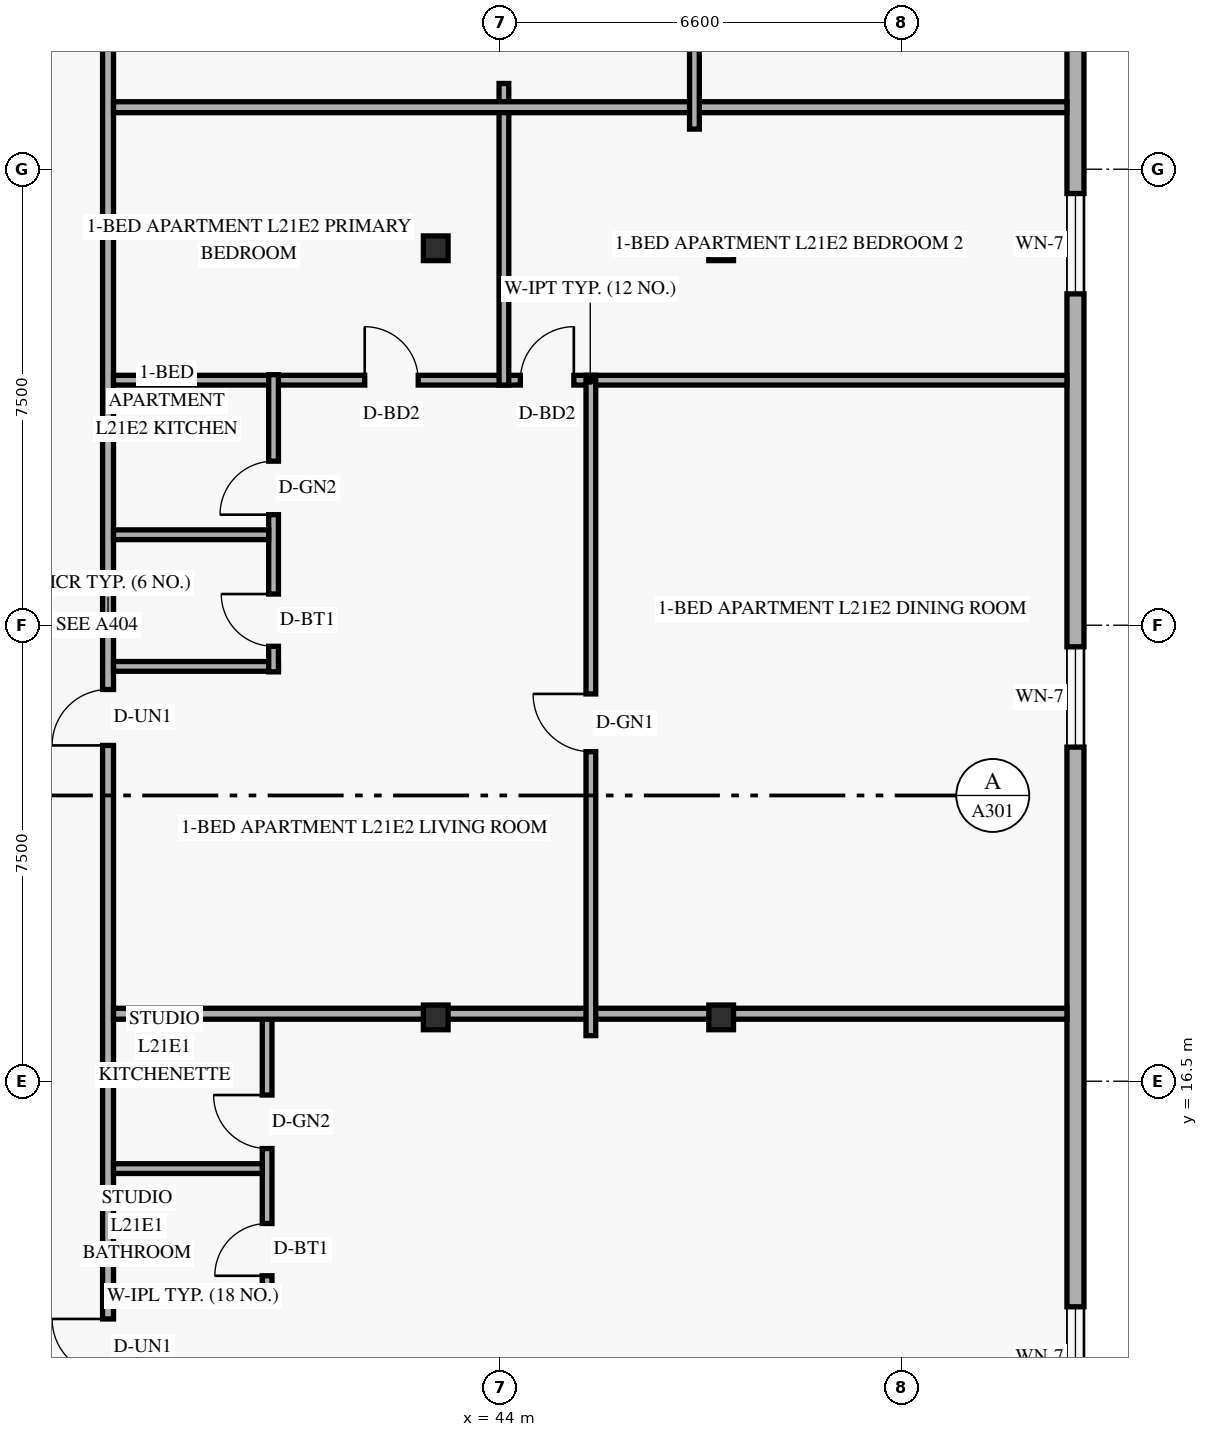
"""IFC4 building model, lengths in metres.
Left out: names, types, materials, properties, quantities, classifications, styles, units other than length and angle.
Written with IfcOpenShell. Run it as: python <this file> out.ifc"""

import sys

from ifc_helpers import new_model, si_unit, direction, frame, frame_2d, origin, origin_2d, place, context, subcontext, project, spatial, rectangle, hollow_rectangle, extrude, element, fill, save


model = new_model("IFC4")
c1 = context("Model", 3, precision=1e-05, world=origin(), true_north=direction((0.0, 1.0)))
c2 = subcontext(c1, "Body", "Model", "MODEL_VIEW")
j1 = project(units=[si_unit("LENGTHUNIT", "METRE"), si_unit("PLANEANGLEUNIT", "RADIAN")], contexts=[c1])
p1 = place(None, origin())
s1 = spatial("IfcSite", under=j1, at=p1, CompositionType="ELEMENT")
p2 = place(p1, origin())
s2 = spatial("IfcBuilding", under=s1, at=p2, CompositionType="ELEMENT")
p3 = place(p2, frame((0.0, 0.0, 84.0)))
s3 = spatial("IfcBuildingStorey", under=s2, at=p3, CompositionType="ELEMENT", Elevation=84.0)
for number, where, z_axis, x_axis in (
    (1, (42.876, 17.55, 0.0), (0.035, 0.0, 0.999), (0.0, 1.0, 0.0)),
    (2, (42.876, 30.2, 0.0), (0.035, 0.0, 0.999), (0.0, 1.0, 0.0)),
):
    element("IfcColumn", number, at=place(p3, frame(where, z_axis=z_axis, x_axis=x_axis)), inside=s3, PredefinedType="COLUMN", context=c2, shape_type="SweptSolid", body=[
        extrude(hollow_rectangle(XDim=0.406, YDim=0.406, WallThickness=0.016, at=origin_2d()), origin(), (0.0, 0.0, 1.0), 3.602),
    ])
for number, where, z_axis, x_axis in (
    (3, (47.529, 17.55, 0.0), (0.058, 0.0, 0.998), (0.0, 1.0, 0.0)),
    (4, (47.529, 30.2, 0.0), (0.058, 0.0, 0.998), (0.0, 1.0, 0.0)),
):
    element("IfcColumn", number, at=place(p3, frame(where, z_axis=z_axis, x_axis=x_axis)), inside=s3, PredefinedType="COLUMN", context=c2, shape_type="SweptSolid", body=[
        extrude(hollow_rectangle(XDim=0.406, YDim=0.406, WallThickness=0.016, at=origin_2d()), origin(), (0.0, 0.0, 1.0), 3.606),
    ])
p4 = place(p3, frame((53.46, 6.32, 0.0), z_axis=(0.0, 0.0, 1.0), x_axis=(0.0, 1.0, 0.0)))
e5 = element("IfcWall", 5, at=p4, inside=s3, PredefinedType="SOLIDWALL", context=c2, shape_type="SweptSolid", body=[
    extrude(rectangle(XDim=35.36, YDim=0.28, at=frame_2d((17.68, 0.0))), origin(), (0.0, 0.0, 1.0), 3.36),
])
p5 = place(p4, frame((4.82, 0.0, 0.85)))
e6 = element("IfcOpeningElement", 6, at=p5, cuts=e5, PredefinedType="OPENING", context=c2, shape_type="SweptSolid", body=[
    extrude(rectangle(XDim=1.65, YDim=1.6, at=frame_2d((0.825, 0.8))), frame((0.0, 0.15, 0.0), z_axis=(0.0, -1.0, 0.0), x_axis=(1.0, 0.0, 0.0)), (0.0, 0.0, 1.0), 0.3),
])
p6 = place(p4, frame((15.675, 0.0, 0.85)))
e7 = element("IfcOpeningElement", 7, at=p6, cuts=e5, PredefinedType="OPENING", context=c2, shape_type="SweptSolid", body=[
    extrude(rectangle(XDim=1.65, YDim=1.6, at=frame_2d((0.825, 0.8))), frame((0.0, 0.15, 0.0), z_axis=(0.0, -1.0, 0.0), x_axis=(1.0, 0.0, 0.0)), (0.0, 0.0, 1.0), 0.3),
])
p7 = place(p4, frame((23.13, 0.0, 0.85)))
e8 = element("IfcOpeningElement", 8, at=p7, cuts=e5, PredefinedType="OPENING", context=c2, shape_type="SweptSolid", body=[
    extrude(rectangle(XDim=1.65, YDim=1.6, at=frame_2d((0.825, 0.8))), frame((0.0, 0.15, 0.0), z_axis=(0.0, -1.0, 0.0), x_axis=(1.0, 0.0, 0.0)), (0.0, 0.0, 1.0), 0.3),
])
p8 = place(p4, frame((29.695, 0.0, 0.85)))
e9 = element("IfcOpeningElement", 9, at=p8, cuts=e5, PredefinedType="OPENING", context=c2, shape_type="SweptSolid", body=[
    extrude(rectangle(XDim=1.65, YDim=1.6, at=frame_2d((0.825, 0.8))), frame((0.0, 0.15, 0.0), z_axis=(0.0, -1.0, 0.0), x_axis=(1.0, 0.0, 0.0)), (0.0, 0.0, 1.0), 0.3),
])
p9 = place(p3, frame((37.55, 2.98, 0.0), z_axis=(0.0, 0.0, 1.0), x_axis=(0.0, 1.0, 0.0)))
e10 = element("IfcWall", 10, at=p9, inside=s3, PredefinedType="STANDARD", context=c2, shape_type="SweptSolid", body=[
    extrude(rectangle(XDim=42.04, YDim=0.18, at=frame_2d((21.02, 0.0))), origin(), (0.0, 0.0, 1.0), 2.731),
])
p10 = place(p9, frame((8.69, 0.0, 0.0)))
e11 = element("IfcOpeningElement", 11, at=p10, cuts=e10, PredefinedType="OPENING", context=c2, shape_type="SweptSolid", body=[
    extrude(rectangle(XDim=0.92, YDim=2.15, at=frame_2d((0.46, 1.075))), frame((0.0, 0.1, 0.0), z_axis=(0.0, -1.0, 0.0), x_axis=(1.0, 0.0, 0.0)), (0.0, 0.0, 1.0), 0.2),
])
p11 = place(p9, frame((19.043, 0.0, 0.0)))
e12 = element("IfcOpeningElement", 12, at=p11, cuts=e10, PredefinedType="OPENING", context=c2, shape_type="SweptSolid", body=[
    extrude(rectangle(XDim=0.92, YDim=2.15, at=frame_2d((0.46, 1.075))), frame((0.0, 0.1, 0.0), z_axis=(0.0, -1.0, 0.0), x_axis=(1.0, 0.0, 0.0)), (0.0, 0.0, 1.0), 0.2),
])
p12 = place(p9, frame((32.145, 0.0, 0.0)))
e13 = element("IfcOpeningElement", 13, at=p12, cuts=e10, PredefinedType="OPENING", context=c2, shape_type="SweptSolid", body=[
    extrude(rectangle(XDim=0.92, YDim=2.15, at=frame_2d((0.46, 1.075))), frame((0.0, 0.1, 0.0), z_axis=(0.0, -1.0, 0.0), x_axis=(1.0, 0.0, 0.0)), (0.0, 0.0, 1.0), 0.2),
])
p13 = place(p3, frame((37.64, 12.97, 0.0), z_axis=(0.0, 0.0, 1.0), x_axis=(1.0, 0.0, 0.0)))
e14 = element("IfcWall", 14, at=p13, inside=s3, PredefinedType="PLUMBINGWALL", context=c2, shape_type="SweptSolid", body=[
    extrude(rectangle(XDim=2.606, YDim=0.16, at=frame_2d((1.303, 0.0))), origin(), (0.0, 0.0, 1.0), 3.36),
])
p14 = place(p3, frame((40.166, 12.88, 0.0), z_axis=(0.0, 0.0, 1.0), x_axis=(0.0, 1.0, 0.0)))
e15 = element("IfcWall", 15, at=p14, inside=s3, PredefinedType="PLUMBINGWALL", context=c2, shape_type="SweptSolid", body=[
    extrude(rectangle(XDim=4.73, YDim=0.16, at=frame_2d((2.365, 0.0))), origin(), (0.0, 0.0, 1.0), 2.731),
])
p15 = place(p14, frame((0.42, 0.0, 0.0)))
e16 = element("IfcOpeningElement", 16, at=p15, cuts=e15, PredefinedType="OPENING", context=c2, shape_type="SweptSolid", body=[
    extrude(rectangle(XDim=0.86, YDim=2.12, at=frame_2d((0.43, 1.06))), frame((0.0, 0.09, 0.0), z_axis=(0.0, -1.0, 0.0), x_axis=(1.0, 0.0, 0.0)), (0.0, 0.0, 1.0), 0.18),
])
p16 = place(p14, frame((2.513, 0.0, 0.0)))
e17 = element("IfcOpeningElement", 17, at=p16, cuts=e15, PredefinedType="OPENING", context=c2, shape_type="SweptSolid", body=[
    extrude(rectangle(XDim=0.88, YDim=2.12, at=frame_2d((0.44, 1.06))), frame((0.0, 0.09, 0.0), z_axis=(0.0, -1.0, 0.0), x_axis=(1.0, 0.0, 0.0)), (0.0, 0.0, 1.0), 0.18),
])
p17 = place(p3, frame((37.64, 15.063, 0.0), z_axis=(0.0, 0.0, 1.0), x_axis=(1.0, 0.0, 0.0)))
e18 = element("IfcWall", 18, at=p17, inside=s3, PredefinedType="PLUMBINGWALL", context=c2, shape_type="SweptSolid", body=[
    extrude(rectangle(XDim=2.446, YDim=0.16, at=frame_2d((1.223, 0.0))), origin(), (0.0, 0.0, 1.0), 3.36),
])
p18 = place(p3, frame((37.64, 17.61, 0.0), z_axis=(0.0, 0.0, 1.0), x_axis=(1.0, 0.0, 0.0)))
e19 = element("IfcWall", 19, at=p18, inside=s3, PredefinedType="PARTITIONING", context=c2, shape_type="SweptSolid", body=[
    extrude(rectangle(XDim=15.68, YDim=0.18, at=frame_2d((7.84, 0.0))), origin(), (0.0, 0.0, 1.0), 2.731),
])
p19 = place(p3, frame((37.64, 28.03, 0.0), z_axis=(0.0, 0.0, 1.0), x_axis=(1.0, 0.0, 0.0)))
e20 = element("IfcWall", 20, at=p19, inside=s3, PredefinedType="PARTITIONING", context=c2, shape_type="SweptSolid", body=[
    extrude(rectangle(XDim=15.68, YDim=0.16, at=frame_2d((7.84, 0.0))), origin(), (0.0, 0.0, 1.0), 2.731),
])
p20 = place(p19, frame((4.131, 0.0, 0.0)))
e21 = element("IfcOpeningElement", 21, at=p20, cuts=e20, PredefinedType="OPENING", context=c2, shape_type="SweptSolid", body=[
    extrude(rectangle(XDim=0.88, YDim=2.14, at=frame_2d((0.44, 1.07))), frame((0.0, 0.09, 0.0), z_axis=(0.0, -1.0, 0.0), x_axis=(1.0, 0.0, 0.0)), (0.0, 0.0, 1.0), 0.18),
])
p21 = place(p19, frame((6.69, 0.0, 0.0)))
e22 = element("IfcOpeningElement", 22, at=p21, cuts=e20, PredefinedType="OPENING", context=c2, shape_type="SweptSolid", body=[
    extrude(rectangle(XDim=0.88, YDim=2.14, at=frame_2d((0.44, 1.07))), frame((0.0, 0.09, 0.0), z_axis=(0.0, -1.0, 0.0), x_axis=(1.0, 0.0, 0.0)), (0.0, 0.0, 1.0), 0.18),
])
p22 = place(p3, frame((37.64, 23.323, 0.0), z_axis=(0.0, 0.0, 1.0), x_axis=(1.0, 0.0, 0.0)))
e23 = element("IfcWall", 23, at=p22, inside=s3, PredefinedType="PLUMBINGWALL", context=c2, shape_type="SweptSolid", body=[
    extrude(rectangle(XDim=2.712, YDim=0.16, at=frame_2d((1.356, 0.0))), origin(), (0.0, 0.0, 1.0), 3.36),
])
p23 = place(p3, frame((40.272, 23.233, 0.0), z_axis=(0.0, 0.0, 1.0), x_axis=(0.0, 1.0, 0.0)))
e24 = element("IfcWall", 24, at=p23, inside=s3, PredefinedType="PLUMBINGWALL", context=c2, shape_type="SweptSolid", body=[
    extrude(rectangle(XDim=4.887, YDim=0.16, at=frame_2d((2.444, 0.0))), origin(), (0.0, 0.0, 1.0), 3.36),
])
p24 = place(p23, frame((0.42, 0.0, 0.0)))
e25 = element("IfcOpeningElement", 25, at=p24, cuts=e24, PredefinedType="OPENING", context=c2, shape_type="SweptSolid", body=[
    extrude(rectangle(XDim=0.86, YDim=2.12, at=frame_2d((0.43, 1.06))), frame((0.0, 0.09, 0.0), z_axis=(0.0, -1.0, 0.0), x_axis=(1.0, 0.0, 0.0)), (0.0, 0.0, 1.0), 0.18),
])
p25 = place(p23, frame((2.585, 0.0, 0.0)))
e26 = element("IfcOpeningElement", 26, at=p25, cuts=e24, PredefinedType="OPENING", context=c2, shape_type="SweptSolid", body=[
    extrude(rectangle(XDim=0.88, YDim=2.12, at=frame_2d((0.44, 1.06))), frame((0.0, 0.09, 0.0), z_axis=(0.0, -1.0, 0.0), x_axis=(1.0, 0.0, 0.0)), (0.0, 0.0, 1.0), 0.18),
])
p26 = place(p3, frame((37.64, 25.488, 0.0), z_axis=(0.0, 0.0, 1.0), x_axis=(1.0, 0.0, 0.0)))
e27 = element("IfcWall", 27, at=p26, inside=s3, PredefinedType="PLUMBINGWALL", context=c2, shape_type="SweptSolid", body=[
    extrude(rectangle(XDim=2.552, YDim=0.16, at=frame_2d((1.276, 0.0))), origin(), (0.0, 0.0, 1.0), 3.36),
])
p27 = place(p3, frame((45.49, 17.25, 0.0), z_axis=(0.0, 0.0, 1.0), x_axis=(0.0, 1.0, 0.0)))
e28 = element("IfcWall", 28, at=p27, inside=s3, PredefinedType="PARTITIONING", context=c2, shape_type="SweptSolid", body=[
    extrude(rectangle(XDim=10.86, YDim=0.16, at=frame_2d((5.43, 0.0))), origin(), (0.0, 0.0, 1.0), 2.731),
])
p28 = place(p27, frame((4.67, 0.0, 0.0)))
e29 = element("IfcOpeningElement", 29, at=p28, cuts=e28, PredefinedType="OPENING", context=c2, shape_type="SweptSolid", body=[
    extrude(rectangle(XDim=0.95, YDim=2.15, at=frame_2d((0.475, 1.075))), frame((0.0, 0.09, 0.0), z_axis=(0.0, -1.0, 0.0), x_axis=(1.0, 0.0, 0.0)), (0.0, 0.0, 1.0), 0.18),
])
p29 = place(p3, frame((44.061, 27.95, 0.0), z_axis=(0.0, 0.0, 1.0), x_axis=(0.0, 1.0, 0.0)))
e30 = element("IfcWall", 30, at=p29, inside=s3, PredefinedType="PARTITIONING", context=c2, shape_type="SweptSolid", body=[
    extrude(rectangle(XDim=4.96, YDim=0.16, at=frame_2d((2.48, 0.0))), origin(), (0.0, 0.0, 1.0), 2.731),
])
p30 = place(p3, frame((37.64, 32.52, 0.0), z_axis=(0.0, 0.0, 1.0), x_axis=(1.0, 0.0, 0.0)))
e31 = element("IfcWall", 31, at=p30, inside=s3, PredefinedType="PARTITIONING", context=c2, shape_type="SweptSolid", body=[
    extrude(rectangle(XDim=15.68, YDim=0.18, at=frame_2d((7.84, 0.0))), origin(), (0.0, 0.0, 1.0), 2.731),
])
p31 = place(p3, frame((47.194, 32.16, 0.0), z_axis=(0.0, 0.0, 1.0), x_axis=(0.0, 1.0, 0.0)))
e32 = element("IfcWall", 32, at=p31, inside=s3, PredefinedType="PARTITIONING", context=c2, shape_type="SweptSolid", body=[
    extrude(rectangle(XDim=9.08, YDim=0.16, at=frame_2d((4.54, 0.0))), origin(), (0.0, 0.0, 1.0), 2.731),
])
p32 = place(p31, frame((3.78, 0.0, 0.0)))
e33 = element("IfcOpeningElement", 33, at=p32, cuts=e32, PredefinedType="OPENING", context=c2, shape_type="SweptSolid", body=[
    extrude(rectangle(XDim=0.95, YDim=2.15, at=frame_2d((0.475, 1.075))), frame((0.0, 0.09, 0.0), z_axis=(0.0, -1.0, 0.0), x_axis=(1.0, 0.0, 0.0)), (0.0, 0.0, 1.0), 0.18),
])
p33 = place(p5, origin())
e34 = element("IfcWindow", 34, at=p33, inside=s3, PartitioningType="SINGLE_PANEL", PredefinedType="WINDOW", context=c2, shape_type="SweptSolid", body=[
    extrude(rectangle(XDim=1.65, YDim=1.6, at=frame_2d((0.825, 0.8))), frame((0.0, 0.03, 0.0), z_axis=(0.0, -1.0, 0.0), x_axis=(1.0, 0.0, 0.0)), (0.0, 0.0, 1.0), 0.06),
])
fill(e6, e34)
p34 = place(p6, origin())
e35 = element("IfcWindow", 35, at=p34, inside=s3, PartitioningType="SINGLE_PANEL", PredefinedType="WINDOW", context=c2, shape_type="SweptSolid", body=[
    extrude(rectangle(XDim=1.65, YDim=1.6, at=frame_2d((0.825, 0.8))), frame((0.0, 0.03, 0.0), z_axis=(0.0, -1.0, 0.0), x_axis=(1.0, 0.0, 0.0)), (0.0, 0.0, 1.0), 0.06),
])
fill(e7, e35)
p35 = place(p7, origin())
e36 = element("IfcWindow", 36, at=p35, inside=s3, PartitioningType="SINGLE_PANEL", PredefinedType="WINDOW", context=c2, shape_type="SweptSolid", body=[
    extrude(rectangle(XDim=1.65, YDim=1.6, at=frame_2d((0.825, 0.8))), frame((0.0, 0.03, 0.0), z_axis=(0.0, -1.0, 0.0), x_axis=(1.0, 0.0, 0.0)), (0.0, 0.0, 1.0), 0.06),
])
fill(e8, e36)
p36 = place(p10, origin())
e37 = element("IfcDoor", 37, at=p36, inside=s3, OperationType="SINGLE_SWING_RIGHT", PredefinedType="DOOR", context=c2, shape_type="SweptSolid", body=[
    extrude(rectangle(XDim=0.92, YDim=2.15, at=frame_2d((0.46, 1.075))), frame((0.0, 0.025, 0.0), z_axis=(0.0, -1.0, 0.0), x_axis=(1.0, 0.0, 0.0)), (0.0, 0.0, 1.0), 0.05),
])
fill(e11, e37)
p37 = place(p15, origin())
e38 = element("IfcDoor", 38, at=p37, inside=s3, OperationType="SINGLE_SWING_LEFT", PredefinedType="DOOR", context=c2, shape_type="SweptSolid", body=[
    extrude(rectangle(XDim=0.86, YDim=2.12, at=frame_2d((0.43, 1.06))), frame((0.0, 0.025, 0.0), z_axis=(0.0, -1.0, 0.0), x_axis=(1.0, 0.0, 0.0)), (0.0, 0.0, 1.0), 0.05),
])
fill(e16, e38)
p38 = place(p16, origin())
e39 = element("IfcDoor", 39, at=p38, inside=s3, OperationType="SINGLE_SWING_RIGHT", PredefinedType="DOOR", context=c2, shape_type="SweptSolid", body=[
    extrude(rectangle(XDim=0.88, YDim=2.12, at=frame_2d((0.44, 1.06))), frame((0.0, 0.025, 0.0), z_axis=(0.0, -1.0, 0.0), x_axis=(1.0, 0.0, 0.0)), (0.0, 0.0, 1.0), 0.05),
])
fill(e17, e39)
p39 = place(p28, origin())
e40 = element("IfcDoor", 40, at=p39, inside=s3, OperationType="SINGLE_SWING_RIGHT", PredefinedType="DOOR", context=c2, shape_type="SweptSolid", body=[
    extrude(rectangle(XDim=0.95, YDim=2.15, at=frame_2d((0.475, 1.075))), frame((0.0, 0.025, 0.0), z_axis=(0.0, -1.0, 0.0), x_axis=(1.0, 0.0, 0.0)), (0.0, 0.0, 1.0), 0.05),
])
fill(e29, e40)
p40 = place(p11, origin())
e41 = element("IfcDoor", 41, at=p40, inside=s3, OperationType="SINGLE_SWING_LEFT", PredefinedType="DOOR", context=c2, shape_type="SweptSolid", body=[
    extrude(rectangle(XDim=0.92, YDim=2.15, at=frame_2d((0.46, 1.075))), frame((0.0, 0.025, 0.0), z_axis=(0.0, -1.0, 0.0), x_axis=(1.0, 0.0, 0.0)), (0.0, 0.0, 1.0), 0.05),
])
fill(e12, e41)
p41 = place(p24, origin())
e42 = element("IfcDoor", 42, at=p41, inside=s3, OperationType="SINGLE_SWING_RIGHT", PredefinedType="DOOR", context=c2, shape_type="SweptSolid", body=[
    extrude(rectangle(XDim=0.86, YDim=2.12, at=frame_2d((0.43, 1.06))), frame((0.0, 0.025, 0.0), z_axis=(0.0, -1.0, 0.0), x_axis=(1.0, 0.0, 0.0)), (0.0, 0.0, 1.0), 0.05),
])
fill(e25, e42)
p42 = place(p25, origin())
e43 = element("IfcDoor", 43, at=p42, inside=s3, OperationType="SINGLE_SWING_LEFT", PredefinedType="DOOR", context=c2, shape_type="SweptSolid", body=[
    extrude(rectangle(XDim=0.88, YDim=2.12, at=frame_2d((0.44, 1.06))), frame((0.0, 0.025, 0.0), z_axis=(0.0, -1.0, 0.0), x_axis=(1.0, 0.0, 0.0)), (0.0, 0.0, 1.0), 0.05),
])
fill(e26, e43)
p43 = place(p20, origin())
e44 = element("IfcDoor", 44, at=p43, inside=s3, OperationType="SINGLE_SWING_LEFT", PredefinedType="DOOR", context=c2, shape_type="SweptSolid", body=[
    extrude(rectangle(XDim=0.88, YDim=2.14, at=frame_2d((0.44, 1.07))), frame((0.0, 0.025, 0.0), z_axis=(0.0, -1.0, 0.0), x_axis=(1.0, 0.0, 0.0)), (0.0, 0.0, 1.0), 0.05),
])
fill(e21, e44)
p44 = place(p21, origin())
e45 = element("IfcDoor", 45, at=p44, inside=s3, OperationType="SINGLE_SWING_RIGHT", PredefinedType="DOOR", context=c2, shape_type="SweptSolid", body=[
    extrude(rectangle(XDim=0.88, YDim=2.14, at=frame_2d((0.44, 1.07))), frame((0.0, 0.025, 0.0), z_axis=(0.0, -1.0, 0.0), x_axis=(1.0, 0.0, 0.0)), (0.0, 0.0, 1.0), 0.05),
])
fill(e22, e45)
save(model, sys.argv[1])
